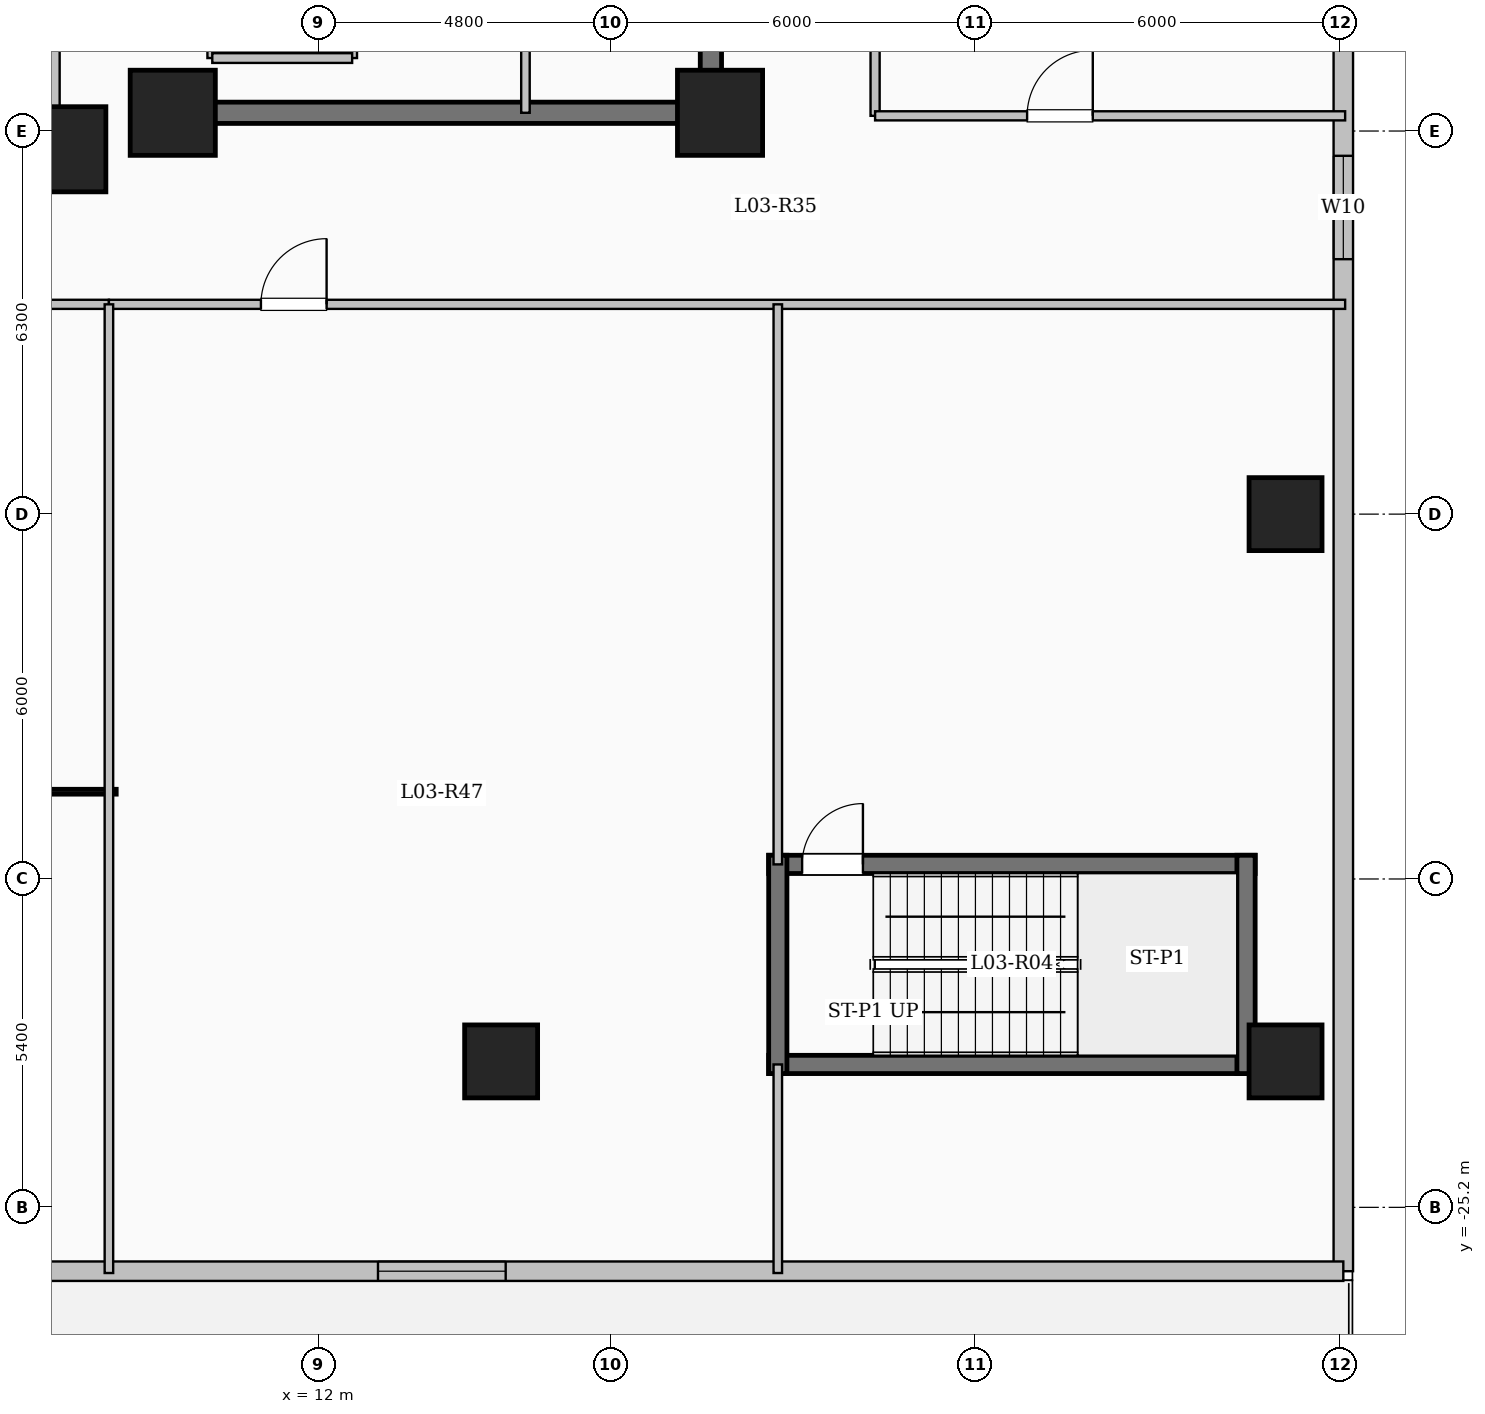
"""IFC4 building model, lengths in metres.
Left out: names, types, materials, properties, quantities, classifications, styles, units other than length and angle.
Written with IfcOpenShell. Run it as: python <this file> out.ifc"""

import sys

from ifc_helpers import new_model, si_unit, direction, frame, frame_2d, origin, origin_2d, place, context, subcontext, project, spatial, rectangle, extrude, element, fill, save


model = new_model("IFC4")
c1 = context("Model", 3, precision=1e-05, world=origin(), true_north=direction((0.0, 1.0)))
c2 = subcontext(c1, "Body", "Model", "MODEL_VIEW")
j1 = project(units=[si_unit("LENGTHUNIT", "METRE"), si_unit("PLANEANGLEUNIT", "RADIAN")], contexts=[c1])
p1 = place(None, origin())
s1 = spatial("IfcSite", under=j1, at=p1, CompositionType="ELEMENT")
p2 = place(p1, origin())
s2 = spatial("IfcBuilding", under=s1, at=p2, CompositionType="ELEMENT")
p3 = place(p2, frame((0.0, 0.0, 14.4)))
s3 = spatial("IfcBuildingStorey", under=s2, at=p3, CompositionType="ELEMENT", Elevation=14.4)
for number, where, z_axis, x_axis in (
    (1, (7.8, -7.8, 0.0), (0.0, 0.0, 1.0), (1.0, 0.0, 0.0)),
    (2, (9.6, -7.2, 0.0), (0.0, 0.0, 1.0), (1.0, 0.0, 0.0)),
    (3, (18.6, -7.2, 0.0), (0.0, 0.0, 1.0), (1.0, 0.0, 0.0)),
):
    element("IfcColumn", number, at=place(p3, frame(where, z_axis=z_axis, x_axis=x_axis)), inside=s3, PredefinedType="COLUMN", context=c2, shape_type="SweptSolid", body=[
        extrude(rectangle(XDim=1.4, YDim=1.4, at=origin_2d()), origin(), (0.0, 0.0, 1.0), 4.5),
    ])
for number, where, z_axis, x_axis in (
    (4, (15.0, -22.8, 0.0), (0.0, 0.0, 1.0), (1.0, 0.0, 0.0)),
    (5, (27.9, -22.8, 0.0), (0.0, 0.0, 1.0), (1.0, 0.0, 0.0)),
    (6, (27.9, -13.8, 0.0), (0.0, 0.0, 1.0), (1.0, 0.0, 0.0)),
):
    element("IfcColumn", number, at=place(p3, frame(where, z_axis=z_axis, x_axis=x_axis)), inside=s3, PredefinedType="COLUMN", context=c2, shape_type="SweptSolid", body=[
        extrude(rectangle(XDim=1.2, YDim=1.2, at=origin_2d()), origin(), (0.0, 0.0, 1.0), 4.5),
    ])
p4 = place(p3, frame((7.62, -7.62, 0.0), z_axis=(0.0, 0.0, 1.0), x_axis=(0.0, 1.0, 0.0)))
e7 = element("IfcWall", 7, at=p4, inside=s3, PredefinedType="SOLIDWALL", context=c2, shape_type="SweptSolid", body=[
    extrude(rectangle(XDim=15.24, YDim=0.24, at=frame_2d((7.62, 0.0))), origin(), (0.0, 0.0, 1.0), 4.2),
])
p5 = place(p4, frame((6.92, 0.0, 0.95)))
e8 = element("IfcOpeningElement", 8, at=p5, cuts=e7, PredefinedType="OPENING", context=c2, shape_type="SweptSolid", body=[
    extrude(rectangle(XDim=1.4, YDim=1.5, at=frame_2d((0.7, 0.75))), frame((0.0, 0.13, 0.0), z_axis=(0.0, -1.0, 0.0), x_axis=(1.0, 0.0, 0.0)), (0.0, 0.0, 1.0), 0.26),
])
p6 = place(p3, frame((28.85, 29.85, 0.0), z_axis=(0.0, 0.0, 1.0), x_axis=(0.0, -1.0, 0.0)))
e9 = element("IfcWall", 9, at=p6, inside=s3, PredefinedType="SOLIDWALL", context=c2, shape_type="SweptSolid", body=[
    extrude(rectangle(XDim=56.1, YDim=0.32, at=frame_2d((28.05, 0.0))), origin(), (0.0, 0.0, 1.0), 4.2),
])
p7 = place(p6, frame((7.6, 0.0, 0.9)))
e10 = element("IfcOpeningElement", 10, at=p7, cuts=e9, PredefinedType="OPENING", context=c2, shape_type="SweptSolid", body=[
    extrude(rectangle(XDim=2.1, YDim=2.0, at=frame_2d((1.05, 1.0))), frame((0.0, 0.17, 0.0), z_axis=(0.0, -1.0, 0.0), x_axis=(1.0, 0.0, 0.0)), (0.0, 0.0, 1.0), 0.34),
])
p8 = place(p6, frame((17.725, 0.0, 0.95)))
e11 = element("IfcOpeningElement", 11, at=p8, cuts=e9, PredefinedType="OPENING", context=c2, shape_type="SweptSolid", body=[
    extrude(rectangle(XDim=1.0, YDim=1.5, at=frame_2d((0.5, 0.75))), frame((0.0, 0.17, 0.0), z_axis=(0.0, -1.0, 0.0), x_axis=(1.0, 0.0, 0.0)), (0.0, 0.0, 1.0), 0.34),
])
p9 = place(p6, frame((27.05, 0.0, 0.9)))
e12 = element("IfcOpeningElement", 12, at=p9, cuts=e9, PredefinedType="OPENING", context=c2, shape_type="SweptSolid", body=[
    extrude(rectangle(XDim=2.1, YDim=2.0, at=frame_2d((1.05, 1.0))), frame((0.0, 0.17, 0.0), z_axis=(0.0, -1.0, 0.0), x_axis=(1.0, 0.0, 0.0)), (0.0, 0.0, 1.0), 0.34),
])
p10 = place(p6, frame((37.758, 0.0, 0.9)))
e13 = element("IfcOpeningElement", 13, at=p10, cuts=e9, PredefinedType="OPENING", context=c2, shape_type="SweptSolid", body=[
    extrude(rectangle(XDim=1.7, YDim=1.9, at=frame_2d((0.85, 0.95))), frame((0.0, 0.17, 0.0), z_axis=(0.0, -1.0, 0.0), x_axis=(1.0, 0.0, 0.0)), (0.0, 0.0, 1.0), 0.34),
])
p11 = place(p3, frame((28.85, -26.25, 0.0), z_axis=(0.0, 0.0, 1.0), x_axis=(-1.0, 0.0, 0.0)))
e14 = element("IfcWall", 14, at=p11, inside=s3, PredefinedType="SOLIDWALL", context=c2, shape_type="SweptSolid", body=[
    extrude(rectangle(XDim=57.7, YDim=0.32, at=frame_2d((28.85, 0.0))), origin(), (0.0, 0.0, 1.0), 4.2),
])
p12 = place(p11, frame((32.75, 0.0, 0.0)))
e15 = element("IfcOpeningElement", 15, at=p12, cuts=e14, PredefinedType="OPENING", context=c2, shape_type="SweptSolid", body=[
    extrude(rectangle(XDim=1.25, YDim=2.25, at=frame_2d((0.625, 1.125))), frame((0.0, 0.17, 0.0), z_axis=(0.0, -1.0, 0.0), x_axis=(1.0, 0.0, 0.0)), (0.0, 0.0, 1.0), 0.34),
])
p13 = place(p11, frame((13.775, 0.0, 0.9)))
e16 = element("IfcOpeningElement", 16, at=p13, cuts=e14, PredefinedType="OPENING", context=c2, shape_type="SweptSolid", body=[
    extrude(rectangle(XDim=2.1, YDim=2.0, at=frame_2d((1.05, 1.0))), frame((0.0, 0.17, 0.0), z_axis=(0.0, -1.0, 0.0), x_axis=(1.0, 0.0, 0.0)), (0.0, 0.0, 1.0), 0.34),
])
p14 = place(p11, frame((25.63, 0.0, 0.9)))
e17 = element("IfcOpeningElement", 17, at=p14, cuts=e14, PredefinedType="OPENING", context=c2, shape_type="SweptSolid", body=[
    extrude(rectangle(XDim=2.1, YDim=2.0, at=frame_2d((1.05, 1.0))), frame((0.0, 0.17, 0.0), z_axis=(0.0, -1.0, 0.0), x_axis=(1.0, 0.0, 0.0)), (0.0, 0.0, 1.0), 0.34),
])
p15 = place(p11, frame((46.55, 0.0, 0.9)))
e18 = element("IfcOpeningElement", 18, at=p15, cuts=e14, PredefinedType="OPENING", context=c2, shape_type="SweptSolid", body=[
    extrude(rectangle(XDim=2.1, YDim=2.0, at=frame_2d((1.05, 1.0))), frame((0.0, 0.17, 0.0), z_axis=(0.0, -1.0, 0.0), x_axis=(1.0, 0.0, 0.0)), (0.0, 0.0, 1.0), 0.34),
])
p16 = place(p3, frame((19.4, -19.56, 0.0), z_axis=(0.0, 0.0, 1.0), x_axis=(1.0, 0.0, 0.0)))
e19 = element("IfcWall", 19, at=p16, inside=s3, PredefinedType="SHEAR", context=c2, shape_type="SweptSolid", body=[
    extrude(rectangle(XDim=8.0, YDim=0.3, at=frame_2d((4.0, 0.0))), origin(), (0.0, 0.0, 1.0), 4.5),
])
p17 = place(p16, frame((0.55, 0.0, 0.0)))
e20 = element("IfcOpeningElement", 20, at=p17, cuts=e19, PredefinedType="OPENING", context=c2, shape_type="SweptSolid", body=[
    extrude(rectangle(XDim=1.0, YDim=2.15, at=frame_2d((0.5, 1.075))), frame((0.0, 0.16, 0.0), z_axis=(0.0, -1.0, 0.0), x_axis=(1.0, 0.0, 0.0)), (0.0, 0.0, 1.0), 0.32),
])
p18 = place(p3, frame((19.4, -22.85, 0.0), z_axis=(0.0, 0.0, 1.0), x_axis=(1.0, 0.0, 0.0)))
e21 = element("IfcWall", 21, at=p18, inside=s3, PredefinedType="SHEAR", context=c2, shape_type="SweptSolid", body=[
    extrude(rectangle(XDim=8.0, YDim=0.3, at=frame_2d((4.0, 0.0))), origin(), (0.0, 0.0, 1.0), 4.5),
])
for number, where, z_axis, x_axis in (
    (22, (19.55, -23.0, 0.0), (0.0, 0.0, 1.0), (0.0, 1.0, 0.0)),
    (23, (27.25, -23.0, 0.0), (0.0, 0.0, 1.0), (0.0, 1.0, 0.0)),
):
    element("IfcWall", number, at=place(p3, frame(where, z_axis=z_axis, x_axis=x_axis)), inside=s3, PredefinedType="SHEAR", context=c2, shape_type="SweptSolid", body=[
        extrude(rectangle(XDim=3.59, YDim=0.3, at=frame_2d((1.795, 0.0))), origin(), (0.0, 0.0, 1.0), 4.5),
    ])
for number, where, z_axis, x_axis in (
    (24, (10.25, -6.3, 0.0), (0.0, 0.0, 1.0), (0.0, 1.0, 0.0)),
    (25, (12.55, -6.3, 0.0), (0.0, 0.0, 1.0), (0.0, 1.0, 0.0)),
):
    element("IfcWall", number, at=place(p3, frame(where, z_axis=z_axis, x_axis=x_axis)), inside=s3, PredefinedType="SOLIDWALL", context=c2, shape_type="SweptSolid", body=[
        extrude(rectangle(XDim=2.6, YDim=0.16, at=frame_2d((1.3, 0.0))), origin(), (0.0, 0.0, 1.0), 4.2),
    ])
p19 = place(p3, frame((10.25, -6.3, 0.0), z_axis=(0.0, 0.0, 1.0), x_axis=(1.0, 0.0, 0.0)))
e26 = element("IfcWall", 26, at=p19, inside=s3, PredefinedType="SOLIDWALL", context=c2, shape_type="SweptSolid", body=[
    extrude(rectangle(XDim=2.3, YDim=0.16, at=frame_2d((1.15, 0.0))), origin(), (0.0, 0.0, 1.0), 4.2),
])
p20 = place(p3, frame((18.45, -7.375, 0.0), z_axis=(0.0, 0.0, 1.0), x_axis=(0.0, 1.0, 0.0)))
e27 = element("IfcWall", 27, at=p20, inside=s3, PredefinedType="SHEAR", context=c2, shape_type="SweptSolid", body=[
    extrude(rectangle(XDim=14.05, YDim=0.35, at=frame_2d((7.025, 0.0))), origin(), (0.0, 0.0, 1.0), 4.5),
])
p21 = place(p3, frame((10.075, -7.2, 0.0), z_axis=(0.0, 0.0, 1.0), x_axis=(1.0, 0.0, 0.0)))
e28 = element("IfcWall", 28, at=p21, inside=s3, PredefinedType="SHEAR", context=c2, shape_type="SweptSolid", body=[
    extrude(rectangle(XDim=8.55, YDim=0.35, at=frame_2d((4.275, 0.0))), origin(), (0.0, 0.0, 1.0), 4.5),
])
p22 = place(p3, frame((15.4, -7.2, 0.0), z_axis=(0.0, 0.0, 1.0), x_axis=(0.0, 1.0, 0.0)))
e29 = element("IfcWall", 29, at=p22, inside=s3, PredefinedType="PARTITIONING", context=c2, shape_type="SweptSolid", body=[
    extrude(rectangle(XDim=10.45, YDim=0.14, at=frame_2d((5.225, 0.0))), origin(), (0.0, 0.0, 1.0), 4.2),
])
p23 = place(p22, frame((9.25, 0.0, 0.0)))
e30 = element("IfcOpeningElement", 30, at=p23, cuts=e29, PredefinedType="OPENING", context=c2, shape_type="SweptSolid", body=[
    extrude(rectangle(XDim=0.9, YDim=2.08, at=frame_2d((0.45, 1.04))), frame((0.0, 0.08, 0.0), z_axis=(0.0, -1.0, 0.0), x_axis=(1.0, 0.0, 0.0)), (0.0, 0.0, 1.0), 0.16),
])
p24 = place(p3, frame((21.15, -7.25, 0.0), z_axis=(0.0, 0.0, 1.0), x_axis=(0.0, 1.0, 0.0)))
e31 = element("IfcWall", 31, at=p24, inside=s3, PredefinedType="PARTITIONING", context=c2, shape_type="SweptSolid", body=[
    extrude(rectangle(XDim=18.0, YDim=0.15, at=frame_2d((9.0, 0.0))), origin(), (0.0, 0.0, 1.0), 4.2),
])
p25 = place(p3, frame((-8.55, -10.35, 0.0), z_axis=(0.0, 0.0, 1.0), x_axis=(1.0, 0.0, 0.0)))
e32 = element("IfcWall", 32, at=p25, inside=s3, PredefinedType="PARTITIONING", context=c2, shape_type="SweptSolid", body=[
    extrude(rectangle(XDim=17.1, YDim=0.15, at=frame_2d((8.55, 0.0))), origin(), (0.0, 0.0, 1.0), 4.2),
])
p26 = place(p25, frame((3.5, 0.0, 0.0)))
e33 = element("IfcOpeningElement", 33, at=p26, cuts=e32, PredefinedType="OPENING", context=c2, shape_type="SweptSolid", body=[
    extrude(rectangle(XDim=1.2, YDim=2.15, at=frame_2d((0.6, 1.075))), frame((0.0, 0.085, 0.0), z_axis=(0.0, -1.0, 0.0), x_axis=(1.0, 0.0, 0.0)), (0.0, 0.0, 1.0), 0.17),
])
p27 = place(p3, frame((8.55, -10.35, 0.0), z_axis=(0.0, 0.0, 1.0), x_axis=(1.0, 0.0, 0.0)))
e34 = element("IfcWall", 34, at=p27, inside=s3, PredefinedType="PARTITIONING", context=c2, shape_type="SweptSolid", body=[
    extrude(rectangle(XDim=20.33, YDim=0.15, at=frame_2d((10.165, 0.0))), origin(), (0.0, 0.0, 1.0), 4.2),
])
p28 = place(p27, frame((2.5, 0.0, 0.0)))
e35 = element("IfcOpeningElement", 35, at=p28, cuts=e34, PredefinedType="OPENING", context=c2, shape_type="SweptSolid", body=[
    extrude(rectangle(XDim=1.08, YDim=2.15, at=frame_2d((0.54, 1.075))), frame((0.0, 0.085, 0.0), z_axis=(0.0, -1.0, 0.0), x_axis=(1.0, 0.0, 0.0)), (0.0, 0.0, 1.0), 0.17),
])
p29 = place(p3, frame((8.55, -26.28, 0.0), z_axis=(0.0, 0.0, 1.0), x_axis=(0.0, 1.0, 0.0)))
e36 = element("IfcWall", 36, at=p29, inside=s3, PredefinedType="PARTITIONING", context=c2, shape_type="SweptSolid", body=[
    extrude(rectangle(XDim=15.93, YDim=0.14, at=frame_2d((7.965, 0.0))), origin(), (0.0, 0.0, 1.0), 4.2),
])
p30 = place(p3, frame((19.55, -26.28, 0.0), z_axis=(0.0, 0.0, 1.0), x_axis=(0.0, 1.0, 0.0)))
e37 = element("IfcWall", 37, at=p30, inside=s3, PredefinedType="PARTITIONING", context=c2, shape_type="SweptSolid", body=[
    extrude(rectangle(XDim=3.43, YDim=0.14, at=frame_2d((1.715, 0.0))), origin(), (0.0, 0.0, 1.0), 4.2),
])
p31 = place(p3, frame((19.55, -19.56, 0.0), z_axis=(0.0, 0.0, 1.0), x_axis=(0.0, 1.0, 0.0)))
e38 = element("IfcWall", 38, at=p31, inside=s3, PredefinedType="PARTITIONING", context=c2, shape_type="SweptSolid", body=[
    extrude(rectangle(XDim=9.21, YDim=0.14, at=frame_2d((4.605, 0.0))), origin(), (0.0, 0.0, 1.0), 4.2),
])
p32 = place(p3, frame((21.15, -7.25, 0.0), z_axis=(0.0, 0.0, 1.0), x_axis=(1.0, 0.0, 0.0)))
e39 = element("IfcWall", 39, at=p32, inside=s3, PredefinedType="PARTITIONING", context=c2, shape_type="SweptSolid", body=[
    extrude(rectangle(XDim=7.73, YDim=0.15, at=frame_2d((3.865, 0.0))), origin(), (0.0, 0.0, 1.0), 4.2),
])
p33 = place(p32, frame((2.5, 0.0, 0.0)))
e40 = element("IfcOpeningElement", 40, at=p33, cuts=e39, PredefinedType="OPENING", context=c2, shape_type="SweptSolid", body=[
    extrude(rectangle(XDim=1.08, YDim=2.15, at=frame_2d((0.54, 1.075))), frame((0.0, 0.085, 0.0), z_axis=(0.0, -1.0, 0.0), x_axis=(1.0, 0.0, 0.0)), (0.0, 0.0, 1.0), 0.17),
])
p34 = place(p10, origin())
e41 = element("IfcWindow", 41, at=p34, inside=s3, PartitioningType="SINGLE_PANEL", PredefinedType="WINDOW", context=c2, shape_type="SweptSolid", body=[
    extrude(rectangle(XDim=1.7, YDim=1.9, at=frame_2d((0.85, 0.95))), frame((0.0, 0.03, 0.0), z_axis=(0.0, -1.0, 0.0), x_axis=(1.0, 0.0, 0.0)), (0.0, 0.0, 1.0), 0.06),
])
fill(e13, e41)
p35 = place(p13, origin())
e42 = element("IfcWindow", 42, at=p35, inside=s3, PartitioningType="SINGLE_PANEL", PredefinedType="WINDOW", context=c2, shape_type="SweptSolid", body=[
    extrude(rectangle(XDim=2.1, YDim=2.0, at=frame_2d((1.05, 1.0))), frame((0.0, 0.03, 0.0), z_axis=(0.0, -1.0, 0.0), x_axis=(1.0, 0.0, 0.0)), (0.0, 0.0, 1.0), 0.06),
])
fill(e16, e42)
p36 = place(p17, origin())
e43 = element("IfcDoor", 43, at=p36, inside=s3, OperationType="SINGLE_SWING_RIGHT", PredefinedType="DOOR", context=c2, shape_type="SweptSolid", body=[
    extrude(rectangle(XDim=1.0, YDim=2.15, at=frame_2d((0.5, 1.075))), frame((0.0, 0.025, 0.0), z_axis=(0.0, -1.0, 0.0), x_axis=(1.0, 0.0, 0.0)), (0.0, 0.0, 1.0), 0.05),
])
fill(e20, e43)
p37 = place(p28, origin())
e44 = element("IfcDoor", 44, at=p37, inside=s3, OperationType="SINGLE_SWING_RIGHT", PredefinedType="DOOR", context=c2, shape_type="SweptSolid", body=[
    extrude(rectangle(XDim=1.08, YDim=2.15, at=frame_2d((0.54, 1.075))), frame((0.0, 0.025, 0.0), z_axis=(0.0, -1.0, 0.0), x_axis=(1.0, 0.0, 0.0)), (0.0, 0.0, 1.0), 0.05),
])
fill(e35, e44)
p38 = place(p33, origin())
e45 = element("IfcDoor", 45, at=p38, inside=s3, OperationType="SINGLE_SWING_RIGHT", PredefinedType="DOOR", context=c2, shape_type="SweptSolid", body=[
    extrude(rectangle(XDim=1.08, YDim=2.15, at=frame_2d((0.54, 1.075))), frame((0.0, 0.025, 0.0), z_axis=(0.0, -1.0, 0.0), x_axis=(1.0, 0.0, 0.0)), (0.0, 0.0, 1.0), 0.05),
])
fill(e40, e45)
save(model, sys.argv[1])
